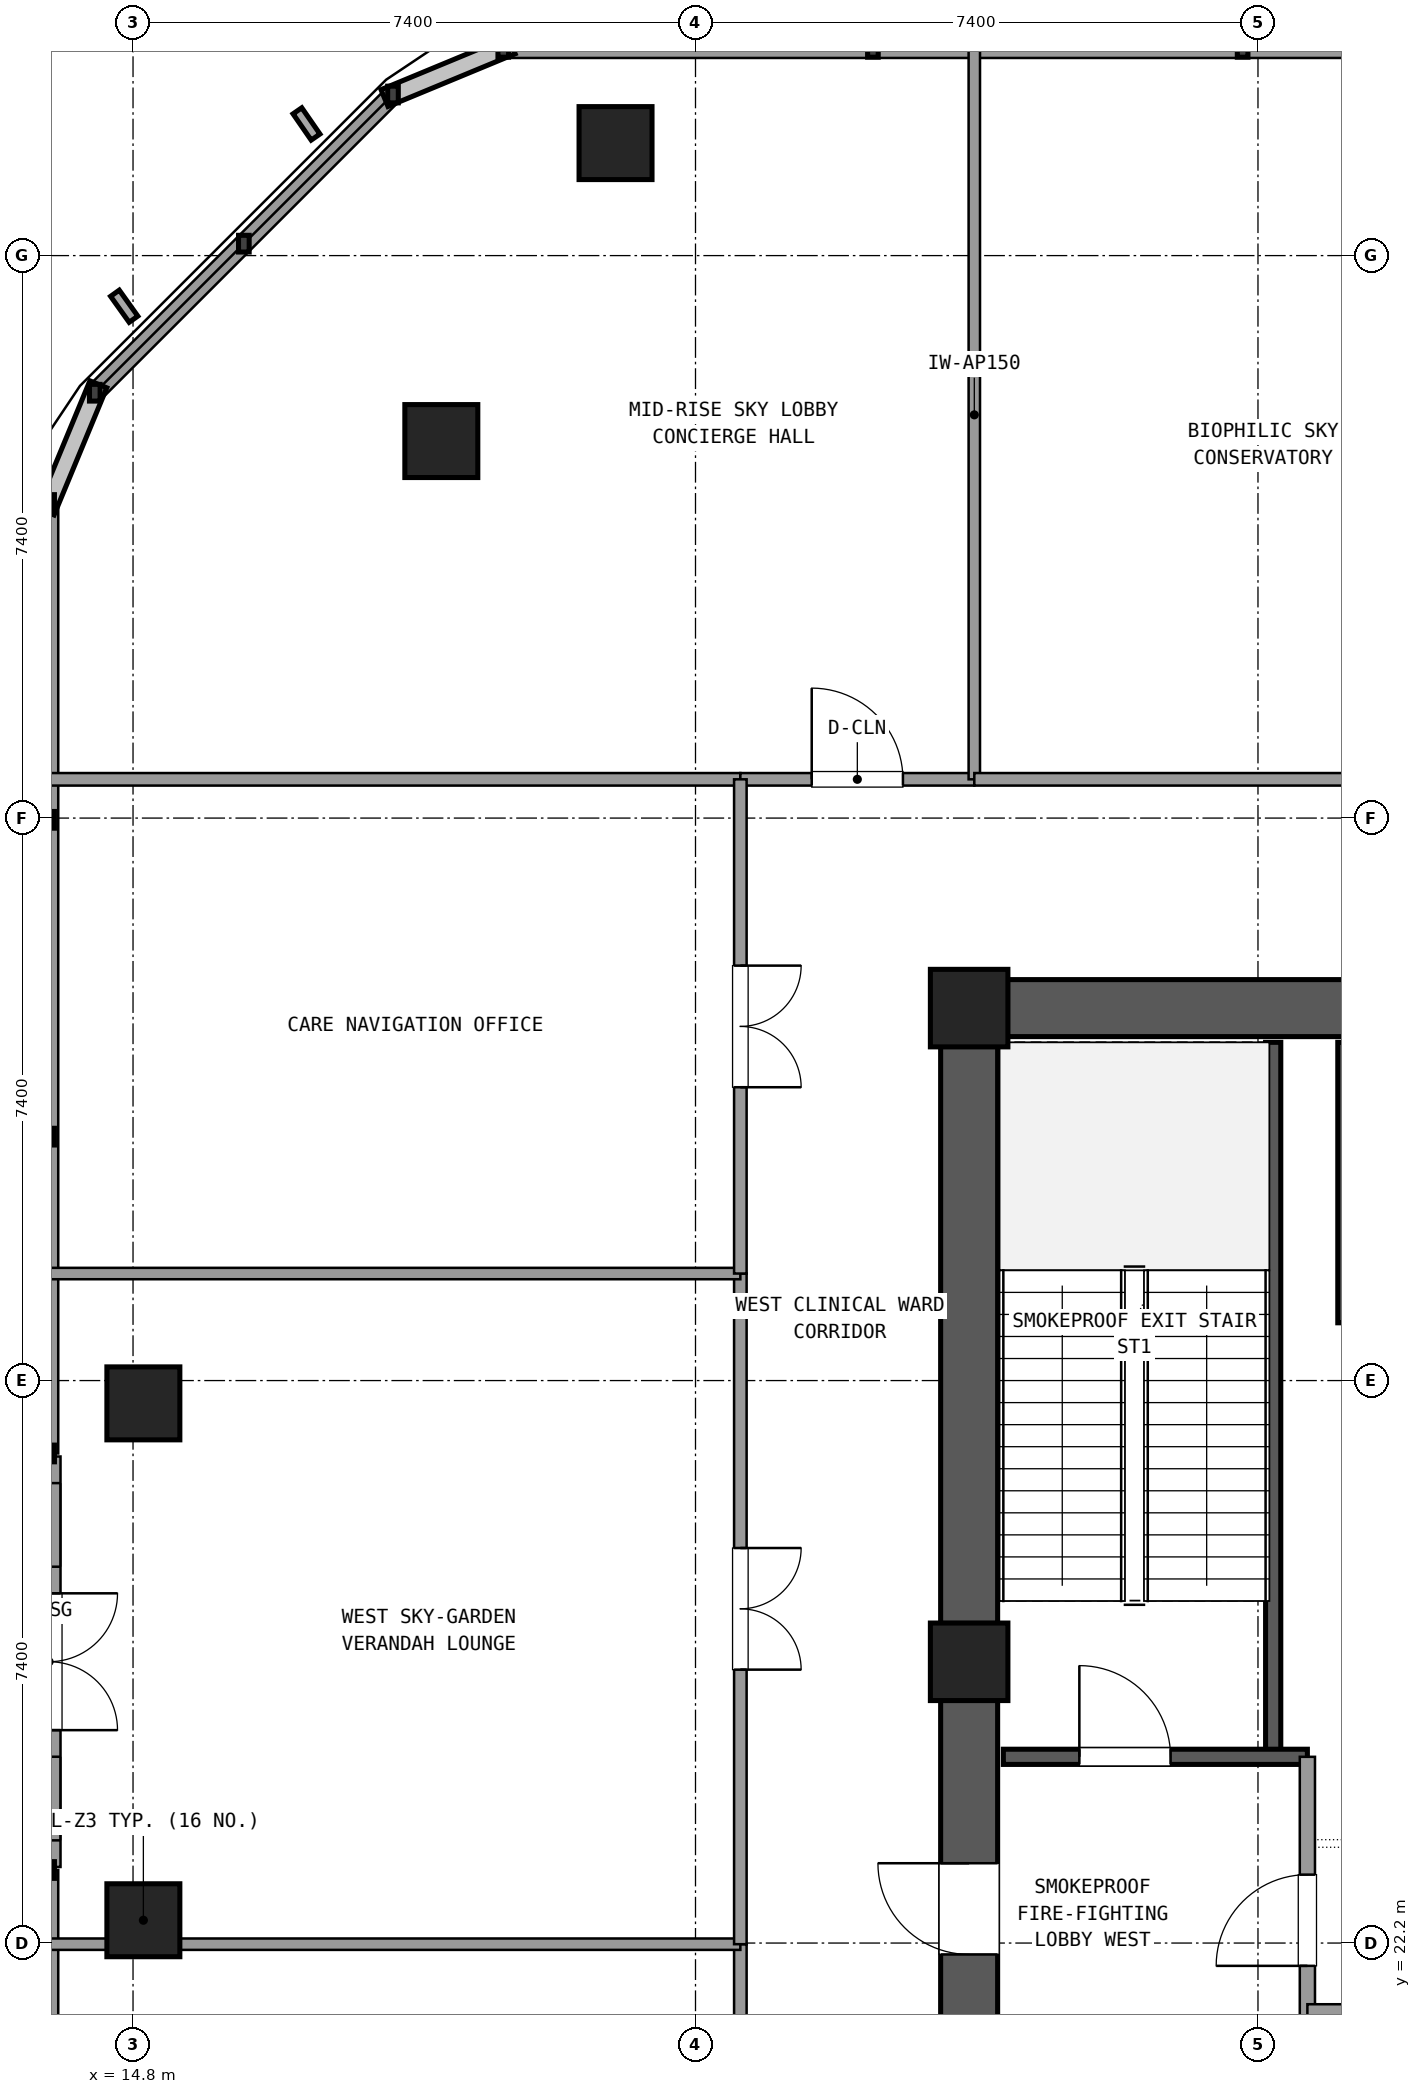
"""IFC4 building model, lengths in metres.
Left out: names, types, materials, properties, quantities, classifications, styles, units other than length and angle.
Written with IfcOpenShell. Run it as: python <this file> out.ifc"""

import sys

from ifc_helpers import new_model, si_unit, direction, frame, frame_2d, origin, origin_2d, place, context, subcontext, project, spatial, rectangle, extrude, element, fill, save


model = new_model("IFC4")
c1 = context("Model", 3, precision=1e-05, world=origin(), true_north=direction((0.0, 1.0)))
c2 = subcontext(c1, "Body", "Model", "MODEL_VIEW")
j1 = project(units=[si_unit("LENGTHUNIT", "METRE"), si_unit("PLANEANGLEUNIT", "RADIAN")], contexts=[c1])
p1 = place(None, origin())
s1 = spatial("IfcSite", under=j1, at=p1, CompositionType="ELEMENT")
p2 = place(p1, origin())
s2 = spatial("IfcBuilding", under=s1, at=p2, CompositionType="ELEMENT")
p3 = place(p2, frame((0.0, 0.0, 129.06)))
s3 = spatial("IfcBuildingStorey", under=s2, at=p3, CompositionType="ELEMENT", Elevation=129.06)
for number, where, z_axis, x_axis in (
    (1, (25.8, 34.5, 0.0), (0.0, 0.0, 1.0), (1.0, 0.0, 0.0)),
    (2, (25.8, 25.9, 0.0), (0.0, 0.0, 1.0), (1.0, 0.0, 0.0)),
):
    element("IfcColumn", number, at=place(p3, frame(where, z_axis=z_axis, x_axis=x_axis)), inside=s3, PredefinedType="COLUMN", context=c2, shape_type="SweptSolid", body=[
        extrude(rectangle(XDim=1.02, YDim=1.02, at=origin_2d()), origin(), (0.0, 0.0, 1.0), 5.76),
    ])
p4 = place(p3, frame((36.495, 34.5, 0.0), z_axis=(0.0, 0.0, 1.0), x_axis=(-1.0, 0.0, 0.0)))
e3 = element("IfcWall", 3, at=p4, inside=s3, PredefinedType="SHEAR", context=c2, shape_type="SweptSolid", body=[
    extrude(rectangle(XDim=10.19, YDim=0.75, at=frame_2d((5.095, 0.0))), origin(), (0.0, 0.0, 1.0), 5.48),
])
p5 = place(p4, frame((4.095, 0.0, 0.0)))
e4 = element("IfcOpeningElement", 4, at=p5, cuts=e3, PredefinedType="OPENING", context=c2, shape_type="SweptSolid", body=[
    extrude(rectangle(XDim=1.2, YDim=2.15, at=frame_2d((0.6, 1.075))), frame((0.0, 0.385, 0.0), z_axis=(0.0, -1.0, 0.0), x_axis=(1.0, 0.0, 0.0)), (0.0, 0.0, 1.0), 0.77),
])
p6 = place(p3, frame((25.8, 33.995, 0.0), z_axis=(0.0, 0.0, 1.0), x_axis=(0.0, -1.0, 0.0)))
e5 = element("IfcWall", 5, at=p6, inside=s3, PredefinedType="SHEAR", context=c2, shape_type="SweptSolid", body=[
    extrude(rectangle(XDim=7.59, YDim=0.75, at=frame_2d((3.795, 0.0))), origin(), (0.0, 0.0, 1.0), 5.48),
])
p7 = place(p3, frame((25.8, 25.395, 0.0), z_axis=(0.0, 0.0, 1.0), x_axis=(0.0, -1.0, 0.0)))
e6 = element("IfcWall", 6, at=p7, inside=s3, PredefinedType="SHEAR", context=c2, shape_type="SweptSolid", body=[
    extrude(rectangle(XDim=7.59, YDim=0.75, at=frame_2d((3.795, 0.0))), origin(), (0.0, 0.0, 1.0), 5.48),
])
p8 = place(p7, frame((2.145, 0.0, 0.0)))
e7 = element("IfcOpeningElement", 7, at=p8, cuts=e6, PredefinedType="OPENING", context=c2, shape_type="SweptSolid", body=[
    extrude(rectangle(XDim=1.2, YDim=2.15, at=frame_2d((0.6, 1.075))), frame((0.0, 0.385, 0.0), z_axis=(0.0, -1.0, 0.0), x_axis=(1.0, 0.0, 0.0)), (0.0, 0.0, 1.0), 0.77),
])
p9 = place(p3, frame((14.936, 22.5, 0.021), z_axis=(0.0, 0.0, 1.0), x_axis=(1.0, 0.0, 0.0)))
e8 = element("IfcColumn", 8, at=p9, inside=s3, PredefinedType="COLUMN", context=c2, shape_type="SweptSolid", body=[
    extrude(rectangle(XDim=0.96, YDim=0.96, at=origin_2d()), origin(), (0.0, 0.0, 1.0), 5.739),
])
for number, where, z_axis, x_axis in (
    (9, (21.148, 45.88, 0.023), (0.0, 0.0, 1.0), (1.0, 0.0, 0.0)),
    (10, (18.856, 41.96, 0.023), (0.0, 0.0, 1.0), (1.0, 0.0, 0.0)),
):
    element("IfcColumn", number, at=place(p3, frame(where, z_axis=z_axis, x_axis=x_axis)), inside=s3, PredefinedType="COLUMN", context=c2, shape_type="SweptSolid", body=[
        extrude(rectangle(XDim=0.96, YDim=0.96, at=origin_2d()), origin(), (0.0, 0.0, 1.0), 5.737),
    ])
p10 = place(p3, frame((14.936, 29.3, 0.021), z_axis=(0.0, 0.0, 1.0), x_axis=(1.0, 0.0, 0.0)))
e11 = element("IfcColumn", 11, at=p10, inside=s3, PredefinedType="COLUMN", context=c2, shape_type="SweptSolid", body=[
    extrude(rectangle(XDim=0.96, YDim=0.96, at=origin_2d()), origin(), (0.0, 0.0, 1.0), 5.739),
])
p11 = place(p3, frame((34.261, 47.12, 0.0), z_axis=(0.0, 0.0, 1.0), x_axis=(-1.0, 0.0, 0.0)))
e12 = element("IfcWall", 12, at=p11, inside=s3, PredefinedType="SOLIDWALL", context=c2, shape_type="SweptSolid", body=[
    extrude(rectangle(XDim=14.59, YDim=0.24, at=frame_2d((7.295, 0.0))), origin(), (0.0, 0.0, 1.0), 0.85),
])
p12 = place(p3, frame((18.22, 46.519, 0.0), z_axis=(0.0, 0.0, 1.0), x_axis=(-0.707084777957, -0.707128783731, 0.0)))
e13 = element("IfcWall", 13, at=p12, inside=s3, PredefinedType="SOLIDWALL", context=c2, shape_type="SweptSolid", body=[
    extrude(rectangle(XDim=5.548, YDim=0.24, at=frame_2d((2.774, 0.0))), origin(), (0.0, 0.0, 1.0), 0.85),
])
p13 = place(p3, frame((13.696, 28.601, 0.0), z_axis=(0.0, 0.0, 1.0), x_axis=(0.0, -1.0, 0.0)))
e14 = element("IfcWall", 14, at=p13, inside=s3, PredefinedType="SOLIDWALL", context=c2, shape_type="SweptSolid", body=[
    extrude(rectangle(XDim=5.4, YDim=0.3, at=frame_2d((2.7, 0.0))), origin(), (0.0, 0.0, 1.0), 4.83),
])
p14 = place(p13, frame((1.8, 0.0, 0.0)))
e15 = element("IfcOpeningElement", 15, at=p14, cuts=e14, PredefinedType="OPENING", context=c2, shape_type="SweptSolid", body=[
    extrude(rectangle(XDim=1.8, YDim=2.25, at=frame_2d((0.9, 1.125))), frame((0.0, 0.16, 0.0), z_axis=(0.0, -1.0, 0.0), x_axis=(1.0, 0.0, 0.0)), (0.0, 0.0, 1.0), 0.32),
])
p15 = place(p13, frame((0.35, 0.0, 0.4)))
e16 = element("IfcOpeningElement", 16, at=p15, cuts=e14, PredefinedType="OPENING", context=c2, shape_type="SweptSolid", body=[
    extrude(rectangle(XDim=1.1, YDim=1.8, at=frame_2d((0.55, 0.9))), frame((0.0, 0.16, 0.0), z_axis=(0.0, -1.0, 0.0), x_axis=(1.0, 0.0, 0.0)), (0.0, 0.0, 1.0), 0.32),
])
p16 = place(p13, frame((3.95, 0.0, 0.4)))
e17 = element("IfcOpeningElement", 17, at=p16, cuts=e14, PredefinedType="OPENING", context=c2, shape_type="SweptSolid", body=[
    extrude(rectangle(XDim=1.1, YDim=1.8, at=frame_2d((0.55, 0.9))), frame((0.0, 0.16, 0.0), z_axis=(0.0, -1.0, 0.0), x_axis=(1.0, 0.0, 0.0)), (0.0, 0.0, 1.0), 0.32),
])
p17 = place(p3, frame((13.696, 41.145, 0.0), z_axis=(0.0, 0.0, 1.0), x_axis=(0.0, -1.0, 0.0)))
e18 = element("IfcWall", 18, at=p17, inside=s3, PredefinedType="SOLIDWALL", context=c2, shape_type="SweptSolid", body=[
    extrude(rectangle(XDim=12.504, YDim=0.24, at=frame_2d((6.252, 0.0))), origin(), (0.0, 0.0, 1.0), 0.85),
])
p18 = place(p3, frame((13.696, 23.161, 0.0), z_axis=(0.0, 0.0, 1.0), x_axis=(0.0, -1.0, 0.0)))
e19 = element("IfcWall", 19, at=p18, inside=s3, PredefinedType="SOLIDWALL", context=c2, shape_type="SweptSolid", body=[
    extrude(rectangle(XDim=12.506, YDim=0.24, at=frame_2d((6.253, 0.0))), origin(), (0.0, 0.0, 1.0), 0.85),
])
p19 = place(p3, frame((29.8, 24.65, 0.0), z_axis=(0.0, 0.0, 1.0), x_axis=(0.0, 1.0, 0.0)))
e20 = element("IfcWall", 20, at=p19, inside=s3, PredefinedType="SHEAR", context=c2, shape_type="SweptSolid", body=[
    extrude(rectangle(XDim=9.4, YDim=0.2, at=frame_2d((4.7, 0.0))), origin(), (0.0, 0.0, 1.0), 5.48),
])
p20 = place(p3, frame((26.25, 24.65, 0.0), z_axis=(0.0, 0.0, 1.0), x_axis=(1.0, 0.0, 0.0)))
e21 = element("IfcWall", 21, at=p20, inside=s3, PredefinedType="SHEAR", context=c2, shape_type="SweptSolid", body=[
    extrude(rectangle(XDim=4.0, YDim=0.2, at=frame_2d((2.0, 0.0))), origin(), (0.0, 0.0, 1.0), 5.48),
])
p21 = place(p20, frame((1.0, 0.0, 0.0)))
e22 = element("IfcOpeningElement", 22, at=p21, cuts=e21, PredefinedType="OPENING", context=c2, shape_type="SweptSolid", body=[
    extrude(rectangle(XDim=1.2, YDim=2.15, at=frame_2d((0.6, 1.075))), frame((0.0, 0.11, 0.0), z_axis=(0.0, -1.0, 0.0), x_axis=(1.0, 0.0, 0.0)), (0.0, 0.0, 1.0), 0.22),
])
p22 = place(p3, frame((30.75, 30.36, 0.0), z_axis=(0.0, 0.0, 1.0), x_axis=(0.0, 1.0, 0.0)))
e23 = element("IfcWall", 23, at=p22, inside=s3, PredefinedType="SHEAR", context=c2, shape_type="SweptSolid", body=[
    extrude(rectangle(XDim=3.69, YDim=0.2, at=frame_2d((1.845, 0.0))), origin(), (0.0, 0.0, 1.0), 5.48),
])
p23 = place(p3, frame((30.25, 17.75, 0.0), z_axis=(0.0, 0.0, 1.0), x_axis=(0.0, 1.0, 0.0)))
e24 = element("IfcWall", 24, at=p23, inside=s3, PredefinedType="SOLIDWALL", context=c2, shape_type="SweptSolid", body=[
    extrude(rectangle(XDim=6.9, YDim=0.2, at=frame_2d((3.45, 0.0))), origin(), (0.0, 0.0, 1.0), 4.77),
])
p24 = place(p23, frame((4.15, 0.0, 0.0)))
e25 = element("IfcOpeningElement", 25, at=p24, cuts=e24, PredefinedType="OPENING", context=c2, shape_type="SweptSolid", body=[
    extrude(rectangle(XDim=1.2, YDim=2.15, at=frame_2d((0.6, 1.075))), frame((0.0, 0.11, 0.0), z_axis=(0.0, -1.0, 0.0), x_axis=(1.0, 0.0, 0.0)), (0.0, 0.0, 1.0), 0.22),
])
p25 = place(p3, frame((30.25, 21.32, 0.0), z_axis=(0.0, 0.0, 1.0), x_axis=(1.0, 0.0, 0.0)))
e26 = element("IfcWall", 26, at=p25, inside=s3, PredefinedType="PARTITIONING", context=c2, shape_type="SweptSolid", body=[
    extrude(rectangle(XDim=7.0, YDim=0.15, at=frame_2d((3.5, 0.0))), origin(), (0.0, 0.0, 1.0), 4.77),
])
p26 = place(p25, frame((0.7, 0.0, 0.0)))
e27 = element("IfcOpeningElement", 27, at=p26, cuts=e26, PredefinedType="OPENING", context=c2, shape_type="SweptSolid", body=[
    extrude(rectangle(XDim=1.0, YDim=2.15, at=frame_2d((0.5, 1.075))), frame((0.0, 0.085, 0.0), z_axis=(0.0, -1.0, 0.0), x_axis=(1.0, 0.0, 0.0)), (0.0, 0.0, 1.0), 0.17),
])
p27 = place(p25, frame((5.5, 0.0, 0.0)))
e28 = element("IfcOpeningElement", 28, at=p27, cuts=e26, PredefinedType="OPENING", context=c2, shape_type="SweptSolid", body=[
    extrude(rectangle(XDim=1.0, YDim=2.15, at=frame_2d((0.5, 1.075))), frame((0.0, 0.085, 0.0), z_axis=(0.0, -1.0, 0.0), x_axis=(1.0, 0.0, 0.0)), (0.0, 0.0, 1.0), 0.17),
])
p28 = place(p3, frame((13.716, 37.51, 0.0), z_axis=(0.0, 0.0, 1.0), x_axis=(1.0, 0.0, 0.0)))
e29 = element("IfcWall", 29, at=p28, inside=s3, PredefinedType="PARTITIONING", context=c2, shape_type="SweptSolid", body=[
    extrude(rectangle(XDim=9.074, YDim=0.165, at=frame_2d((4.537, 0.0))), origin(), (0.0, 0.0, 1.0), 4.77),
])
p29 = place(p3, frame((22.79, 37.51, 0.0), z_axis=(0.0, 0.0, 1.0), x_axis=(1.0, 0.0, 0.0)))
e30 = element("IfcWall", 30, at=p29, inside=s3, PredefinedType="PARTITIONING", context=c2, shape_type="SweptSolid", body=[
    extrude(rectangle(XDim=3.078, YDim=0.165, at=frame_2d((1.539, 0.0))), origin(), (0.0, 0.0, 1.0), 4.77),
])
p30 = place(p29, frame((0.939, 0.0, 0.0)))
e31 = element("IfcOpeningElement", 31, at=p30, cuts=e30, PredefinedType="OPENING", context=c2, shape_type="SweptSolid", body=[
    extrude(rectangle(XDim=1.2, YDim=2.15, at=frame_2d((0.6, 1.075))), frame((0.0, 0.093, 0.0), z_axis=(0.0, -1.0, 0.0), x_axis=(1.0, 0.0, 0.0)), (0.0, 0.0, 1.0), 0.185),
])
p31 = place(p3, frame((25.868, 37.51, 0.0), z_axis=(0.0, 0.0, 1.0), x_axis=(0.0, 1.0, 0.0)))
e32 = element("IfcWall", 32, at=p31, inside=s3, PredefinedType="PARTITIONING", context=c2, shape_type="SweptSolid", body=[
    extrude(rectangle(XDim=9.59, YDim=0.15, at=frame_2d((4.795, 0.0))), origin(), (0.0, 0.0, 1.0), 4.77),
])
p32 = place(p3, frame((25.868, 37.51, 0.0), z_axis=(0.0, 0.0, 1.0), x_axis=(1.0, 0.0, 0.0)))
e33 = element("IfcWall", 33, at=p32, inside=s3, PredefinedType="PARTITIONING", context=c2, shape_type="SweptSolid", body=[
    extrude(rectangle(XDim=16.921, YDim=0.165, at=frame_2d((8.46, 0.0))), origin(), (0.0, 0.0, 1.0), 4.77),
])
p33 = place(p32, frame((7.661, 0.0, 0.0)))
e34 = element("IfcOpeningElement", 34, at=p33, cuts=e33, PredefinedType="OPENING", context=c2, shape_type="SweptSolid", body=[
    extrude(rectangle(XDim=1.6, YDim=2.2, at=frame_2d((0.8, 1.1))), frame((0.0, 0.093, 0.0), z_axis=(0.0, -1.0, 0.0), x_axis=(1.0, 0.0, 0.0)), (0.0, 0.0, 1.0), 0.185),
])
p34 = place(p3, frame((22.79, 14.29, 0.0), z_axis=(0.0, 0.0, 1.0), x_axis=(0.0, 1.0, 0.0)))
e35 = element("IfcWall", 35, at=p34, inside=s3, PredefinedType="PARTITIONING", context=c2, shape_type="SweptSolid", body=[
    extrude(rectangle(XDim=7.895, YDim=0.165, at=frame_2d((3.948, 0.0))), origin(), (0.0, 0.0, 1.0), 4.77),
])
p35 = place(p34, frame((3.147, 0.0, 0.0)))
e36 = element("IfcOpeningElement", 36, at=p35, cuts=e35, PredefinedType="OPENING", context=c2, shape_type="SweptSolid", body=[
    extrude(rectangle(XDim=1.6, YDim=2.2, at=frame_2d((0.8, 1.1))), frame((0.0, 0.093, 0.0), z_axis=(0.0, -1.0, 0.0), x_axis=(1.0, 0.0, 0.0)), (0.0, 0.0, 1.0), 0.185),
])
p36 = place(p3, frame((22.79, 22.185, 0.0), z_axis=(0.0, 0.0, 1.0), x_axis=(-1.0, 0.0, 0.0)))
e37 = element("IfcWall", 37, at=p36, inside=s3, PredefinedType="PARTITIONING", context=c2, shape_type="SweptSolid", body=[
    extrude(rectangle(XDim=9.074, YDim=0.15, at=frame_2d((4.537, 0.0))), origin(), (0.0, 0.0, 1.0), 4.77),
])
p37 = place(p3, frame((22.79, 22.185, 0.0), z_axis=(0.0, 0.0, 1.0), x_axis=(0.0, 1.0, 0.0)))
e38 = element("IfcWall", 38, at=p37, inside=s3, PredefinedType="PARTITIONING", context=c2, shape_type="SweptSolid", body=[
    extrude(rectangle(XDim=8.823, YDim=0.165, at=frame_2d((4.412, 0.0))), origin(), (0.0, 0.0, 1.0), 4.77),
])
p38 = place(p37, frame((3.612, 0.0, 0.0)))
e39 = element("IfcOpeningElement", 39, at=p38, cuts=e38, PredefinedType="OPENING", context=c2, shape_type="SweptSolid", body=[
    extrude(rectangle(XDim=1.6, YDim=2.2, at=frame_2d((0.8, 1.1))), frame((0.0, 0.093, 0.0), z_axis=(0.0, -1.0, 0.0), x_axis=(1.0, 0.0, 0.0)), (0.0, 0.0, 1.0), 0.185),
])
p39 = place(p3, frame((22.79, 31.008, 0.0), z_axis=(0.0, 0.0, 1.0), x_axis=(-1.0, 0.0, 0.0)))
e40 = element("IfcWall", 40, at=p39, inside=s3, PredefinedType="PARTITIONING", context=c2, shape_type="SweptSolid", body=[
    extrude(rectangle(XDim=9.074, YDim=0.15, at=frame_2d((4.537, 0.0))), origin(), (0.0, 0.0, 1.0), 4.77),
])
p40 = place(p3, frame((22.79, 31.008, 0.0), z_axis=(0.0, 0.0, 1.0), x_axis=(0.0, 1.0, 0.0)))
e41 = element("IfcWall", 41, at=p40, inside=s3, PredefinedType="PARTITIONING", context=c2, shape_type="SweptSolid", body=[
    extrude(rectangle(XDim=6.502, YDim=0.165, at=frame_2d((3.251, 0.0))), origin(), (0.0, 0.0, 1.0), 4.77),
])
p41 = place(p40, frame((2.451, 0.0, 0.0)))
e42 = element("IfcOpeningElement", 42, at=p41, cuts=e41, PredefinedType="OPENING", context=c2, shape_type="SweptSolid", body=[
    extrude(rectangle(XDim=1.6, YDim=2.2, at=frame_2d((0.8, 1.1))), frame((0.0, 0.093, 0.0), z_axis=(0.0, -1.0, 0.0), x_axis=(1.0, 0.0, 0.0)), (0.0, 0.0, 1.0), 0.185),
])
p42 = place(p21, origin())
e43 = element("IfcDoor", 43, at=p42, inside=s3, OperationType="SINGLE_SWING_LEFT", PredefinedType="DOOR", context=c2, shape_type="SweptSolid", body=[
    extrude(rectangle(XDim=1.2, YDim=2.15, at=frame_2d((0.6, 1.075))), frame((0.0, 0.025, 0.0), z_axis=(0.0, -1.0, 0.0), x_axis=(1.0, 0.0, 0.0)), (0.0, 0.0, 1.0), 0.05),
])
fill(e22, e43)
p43 = place(p24, origin())
e44 = element("IfcDoor", 44, at=p43, inside=s3, OperationType="SINGLE_SWING_LEFT", PredefinedType="DOOR", context=c2, shape_type="SweptSolid", body=[
    extrude(rectangle(XDim=1.2, YDim=2.15, at=frame_2d((0.6, 1.075))), frame((0.0, 0.025, 0.0), z_axis=(0.0, -1.0, 0.0), x_axis=(1.0, 0.0, 0.0)), (0.0, 0.0, 1.0), 0.05),
])
fill(e25, e44)
p44 = place(p8, frame((1.2, 0.0, 0.0), z_axis=(0.0, 0.0, 1.0), x_axis=(-1.0, 0.0, 0.0)))
e45 = element("IfcDoor", 45, at=p44, inside=s3, OperationType="SINGLE_SWING_LEFT", PredefinedType="DOOR", context=c2, shape_type="SweptSolid", body=[
    extrude(rectangle(XDim=1.2, YDim=2.15, at=frame_2d((0.6, 1.075))), frame((0.0, 0.025, 0.0), z_axis=(0.0, -1.0, 0.0), x_axis=(1.0, 0.0, 0.0)), (0.0, 0.0, 1.0), 0.05),
])
fill(e7, e45)
p45 = place(p30, origin())
e46 = element("IfcDoor", 46, at=p45, inside=s3, OperationType="SINGLE_SWING_LEFT", PredefinedType="DOOR", context=c2, shape_type="SweptSolid", body=[
    extrude(rectangle(XDim=1.2, YDim=2.15, at=frame_2d((0.6, 1.075))), frame((0.0, 0.025, 0.0), z_axis=(0.0, -1.0, 0.0), x_axis=(1.0, 0.0, 0.0)), (0.0, 0.0, 1.0), 0.05),
])
fill(e31, e46)
p46 = place(p38, frame((1.6, 0.0, 0.0), z_axis=(0.0, 0.0, 1.0), x_axis=(-1.0, 0.0, 0.0)))
e47 = element("IfcDoor", 47, at=p46, inside=s3, OperationType="DOUBLE_DOOR_SINGLE_SWING", PredefinedType="DOOR", context=c2, shape_type="SweptSolid", body=[
    extrude(rectangle(XDim=1.6, YDim=2.2, at=frame_2d((0.8, 1.1))), frame((0.0, 0.025, 0.0), z_axis=(0.0, -1.0, 0.0), x_axis=(1.0, 0.0, 0.0)), (0.0, 0.0, 1.0), 0.05),
])
fill(e39, e47)
p47 = place(p41, frame((1.6, 0.0, 0.0), z_axis=(0.0, 0.0, 1.0), x_axis=(-1.0, 0.0, 0.0)))
e48 = element("IfcDoor", 48, at=p47, inside=s3, OperationType="DOUBLE_DOOR_SINGLE_SWING", PredefinedType="DOOR", context=c2, shape_type="SweptSolid", body=[
    extrude(rectangle(XDim=1.6, YDim=2.2, at=frame_2d((0.8, 1.1))), frame((0.0, 0.025, 0.0), z_axis=(0.0, -1.0, 0.0), x_axis=(1.0, 0.0, 0.0)), (0.0, 0.0, 1.0), 0.05),
])
fill(e42, e48)
save(model, sys.argv[1])
